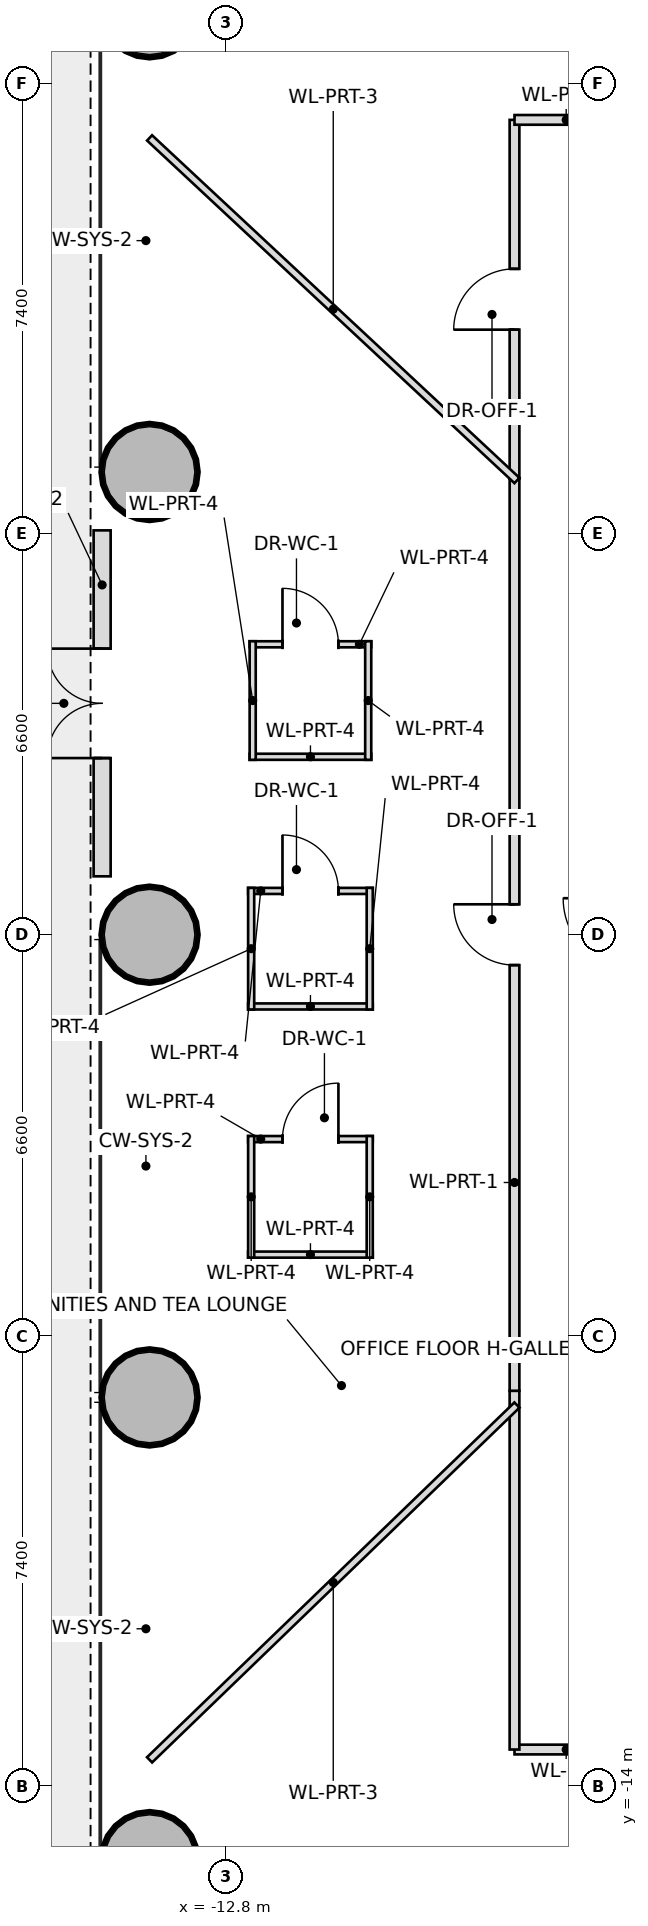
"""IFC4 building model, lengths in metres.
Left out: names, types, materials, properties, quantities, classifications, styles, units other than length and angle.
Written with IfcOpenShell. Run it as: python <this file> out.ifc"""

import sys

from ifc_helpers import new_model, si_unit, direction, frame, frame_2d, origin, origin_2d, place, context, subcontext, project, spatial, rectangle, hollow_circle, extrude, source, transform, mapped, element, fill, save


model = new_model("IFC4")
c1 = context("Model", 3, precision=1e-05, world=origin(), true_north=direction((0.0, 1.0)))
c2 = subcontext(c1, "Body", "Model", "MODEL_VIEW")
j1 = project(units=[si_unit("LENGTHUNIT", "METRE"), si_unit("PLANEANGLEUNIT", "RADIAN")], contexts=[c1])
p1 = place(None, origin())
s1 = spatial("IfcSite", under=j1, at=p1, CompositionType="ELEMENT")
p2 = place(p1, origin())
s2 = spatial("IfcBuilding", under=s1, at=p2, CompositionType="ELEMENT")
p3 = place(p2, frame((0.0, 0.0, 20.1)))
s3 = spatial("IfcBuildingStorey", under=s2, at=p3, CompositionType="ELEMENT", Elevation=20.1)
m1 = source(origin(), c2, "Body", "SweptSolid", [
    extrude(hollow_circle(Radius=0.8, WallThickness=0.055, at=origin_2d()), origin(), (0.0, 0.0, 1.0), 4.02),
])
for number, where, z_axis, x_axis in (
    (1, (-14.052, 15.219, -0.32), (0.0, 0.0, 1.0), (1.0, 0.0, 0.0)),
    (2, (-14.052, 7.61, -0.32), (0.0, 0.0, 1.0), (1.0, 0.0, 0.0)),
    (3, (-14.052, 0.0, -0.32), (0.0, 0.0, 1.0), (1.0, 0.0, 0.0)),
    (4, (-14.052, -7.61, -0.32), (0.0, 0.0, 1.0), (1.0, 0.0, 0.0)),
    (5, (-14.052, -15.219, -0.32), (0.0, 0.0, 1.0), (1.0, 0.0, 0.0)),
):
    element("IfcColumn", number, at=place(p3, frame(where, z_axis=z_axis, x_axis=x_axis)), inside=s3, PredefinedType="COLUMN", context=c2, shape_type="MappedRepresentation", body=[
        mapped(m1, transform((0.0, 0.0, 0.0), scale=1.0)),
    ])
p4 = place(p3, frame((-14.832, 0.96, 0.0), z_axis=(0.0, 0.0, 1.0), x_axis=(0.0, 1.0, 0.0)))
e6 = element("IfcWall", 6, at=p4, inside=s3, PredefinedType="SOLIDWALL", context=c2, shape_type="SweptSolid", body=[
    extrude(rectangle(XDim=5.689, YDim=0.28, at=frame_2d((2.845, 0.0))), origin(), (0.0, 0.0, 1.0), 2.915),
])
p5 = place(p4, frame((1.945, 0.0, 0.0)))
e7 = element("IfcOpeningElement", 7, at=p5, cuts=e6, PredefinedType="OPENING", context=c2, shape_type="SweptSolid", body=[
    extrude(rectangle(XDim=1.8, YDim=2.35, at=frame_2d((0.9, 1.175))), frame((0.0, 0.15, 0.0), z_axis=(0.0, -1.0, 0.0), x_axis=(1.0, 0.0, 0.0)), (0.0, 0.0, 1.0), 0.3),
])
p6 = place(p3, frame((-12.431, 0.72, 0.0), z_axis=(0.0, 0.0, 1.0), x_axis=(1.0, 0.0, 0.0)))
e8 = element("IfcWall", 8, at=p6, inside=s3, PredefinedType="PARTITIONING", context=c2, shape_type="SweptSolid", body=[
    extrude(rectangle(XDim=2.05, YDim=0.1, at=frame_2d((1.025, 0.0))), origin(), (0.0, 0.0, 1.0), 3.15),
])
p7 = place(p6, frame((0.565, 0.0, 0.0)))
e9 = element("IfcOpeningElement", 9, at=p7, cuts=e8, PredefinedType="OPENING", context=c2, shape_type="SweptSolid", body=[
    extrude(rectangle(XDim=0.92, YDim=2.1, at=frame_2d((0.46, 1.05))), frame((0.0, 0.06, 0.0), z_axis=(0.0, -1.0, 0.0), x_axis=(1.0, 0.0, 0.0)), (0.0, 0.0, 1.0), 0.12),
])
p8 = place(p3, frame((-10.381, -1.18, 0.0), z_axis=(0.0, 0.0, 1.0), x_axis=(-1.0, 0.0, 0.0)))
e10 = element("IfcWall", 10, at=p8, inside=s3, PredefinedType="PARTITIONING", context=c2, shape_type="SweptSolid", body=[
    extrude(rectangle(XDim=2.05, YDim=0.1, at=frame_2d((1.025, 0.0))), origin(), (0.0, 0.0, 1.0), 2.8),
])
p9 = place(p3, frame((-10.431, 0.77, 0.0), z_axis=(0.0, 0.0, 1.0), x_axis=(0.0, -1.0, 0.0)))
e11 = element("IfcWall", 11, at=p9, inside=s3, PredefinedType="PARTITIONING", context=c2, shape_type="SweptSolid", body=[
    extrude(rectangle(XDim=2.0, YDim=0.1, at=frame_2d((1.0, 0.0))), origin(), (0.0, 0.0, 1.0), 3.495),
])
p10 = place(p3, frame((-12.381, -1.23, 0.0), z_axis=(0.0, 0.0, 1.0), x_axis=(0.0, 1.0, 0.0)))
e12 = element("IfcWall", 12, at=p10, inside=s3, PredefinedType="PARTITIONING", context=c2, shape_type="SweptSolid", body=[
    extrude(rectangle(XDim=2.0, YDim=0.1, at=frame_2d((1.0, 0.0))), origin(), (0.0, 0.0, 1.0), 2.8),
])
p11 = place(p3, frame((-12.431, -3.361, 0.0), z_axis=(0.0, 0.0, 1.0), x_axis=(1.0, 0.0, 0.0)))
e13 = element("IfcWall", 13, at=p11, inside=s3, PredefinedType="PARTITIONING", context=c2, shape_type="SweptSolid", body=[
    extrude(rectangle(XDim=2.05, YDim=0.1, at=frame_2d((1.025, 0.0))), origin(), (0.0, 0.0, 1.0), 3.15),
])
p12 = place(p11, frame((0.565, 0.0, 0.0)))
e14 = element("IfcOpeningElement", 14, at=p12, cuts=e13, PredefinedType="OPENING", context=c2, shape_type="SweptSolid", body=[
    extrude(rectangle(XDim=0.92, YDim=2.1, at=frame_2d((0.46, 1.05))), frame((0.0, 0.06, 0.0), z_axis=(0.0, -1.0, 0.0), x_axis=(1.0, 0.0, 0.0)), (0.0, 0.0, 1.0), 0.12),
])
p13 = place(p3, frame((-10.381, -5.261, 0.0), z_axis=(0.0, 0.0, 1.0), x_axis=(-1.0, 0.0, 0.0)))
e15 = element("IfcWall", 15, at=p13, inside=s3, PredefinedType="PARTITIONING", context=c2, shape_type="SweptSolid", body=[
    extrude(rectangle(XDim=2.05, YDim=0.1, at=frame_2d((1.025, 0.0))), origin(), (0.0, 0.0, 1.0), 3.15),
])
for number, where, z_axis, x_axis in (
    (16, (-10.431, -3.311, 0.0), (0.0, 0.0, 1.0), (0.0, -1.0, 0.0)),
    (17, (-12.381, -5.311, 0.0), (0.0, 0.0, 1.0), (0.0, 1.0, 0.0)),
):
    element("IfcWall", number, at=place(p3, frame(where, z_axis=z_axis, x_axis=x_axis)), inside=s3, PredefinedType="PARTITIONING", context=c2, shape_type="SweptSolid", body=[
        extrude(rectangle(XDim=2.0, YDim=0.1, at=frame_2d((1.0, 0.0))), origin(), (0.0, 0.0, 1.0), 3.495),
    ])
p14 = place(p3, frame((-12.406, 4.776, 0.0), z_axis=(0.0, 0.0, 1.0), x_axis=(1.0, 0.0, 0.0)))
e18 = element("IfcWall", 18, at=p14, inside=s3, PredefinedType="PARTITIONING", context=c2, shape_type="SweptSolid", body=[
    extrude(rectangle(XDim=2.0, YDim=0.1, at=frame_2d((1.0, 0.0))), origin(), (0.0, 0.0, 1.0), 3.15),
])
p15 = place(p14, frame((0.54, 0.0, 0.0)))
e19 = element("IfcOpeningElement", 19, at=p15, cuts=e18, PredefinedType="OPENING", context=c2, shape_type="SweptSolid", body=[
    extrude(rectangle(XDim=0.92, YDim=2.1, at=frame_2d((0.46, 1.05))), frame((0.0, 0.06, 0.0), z_axis=(0.0, -1.0, 0.0), x_axis=(1.0, 0.0, 0.0)), (0.0, 0.0, 1.0), 0.12),
])
p16 = place(p3, frame((-10.406, 2.926, 0.0), z_axis=(0.0, 0.0, 1.0), x_axis=(-1.0, 0.0, 0.0)))
e20 = element("IfcWall", 20, at=p16, inside=s3, PredefinedType="PARTITIONING", context=c2, shape_type="SweptSolid", body=[
    extrude(rectangle(XDim=2.0, YDim=0.1, at=frame_2d((1.0, 0.0))), origin(), (0.0, 0.0, 1.0), 3.15),
])
for number, where, z_axis, x_axis in (
    (21, (-10.456, 4.826, 0.0), (0.0, 0.0, 1.0), (0.0, -1.0, 0.0)),
    (22, (-12.356, 2.876, 0.0), (0.0, 0.0, 1.0), (0.0, 1.0, 0.0)),
):
    element("IfcWall", number, at=place(p3, frame(where, z_axis=z_axis, x_axis=x_axis)), inside=s3, PredefinedType="PARTITIONING", context=c2, shape_type="SweptSolid", body=[
        extrude(rectangle(XDim=1.95, YDim=0.1, at=frame_2d((0.975, 0.0))), origin(), (0.0, 0.0, 1.0), 3.495),
    ])
p17 = place(p3, frame((-6.35, -13.4, 0.0), z_axis=(0.0, 0.0, 1.0), x_axis=(-1.0, 0.0, 0.0)))
e23 = element("IfcWall", 23, at=p17, inside=s3, PredefinedType="PARTITIONING", context=c2, shape_type="SweptSolid", body=[
    extrude(rectangle(XDim=1.7, YDim=0.16, at=frame_2d((0.85, 0.0))), origin(), (0.0, 0.0, 1.0), 2.8),
])
p18 = place(p3, frame((-8.05, -13.4, 0.0), z_axis=(0.0, 0.0, 1.0), x_axis=(0.0, 1.0, 0.0)))
e24 = element("IfcWall", 24, at=p18, inside=s3, PredefinedType="PARTITIONING", context=c2, shape_type="SweptSolid", body=[
    extrude(rectangle(XDim=5.9, YDim=0.16, at=frame_2d((2.95, 0.0))), origin(), (0.0, 0.0, 1.0), 2.8),
])
p19 = place(p3, frame((-8.05, -7.5, 0.0), z_axis=(0.0, 0.0, 1.0), x_axis=(0.0, 1.0, 0.0)))
e25 = element("IfcWall", 25, at=p19, inside=s3, PredefinedType="PARTITIONING", context=c2, shape_type="SweptSolid", body=[
    extrude(rectangle(XDim=15.0, YDim=0.16, at=frame_2d((7.5, 0.0))), origin(), (0.0, 0.0, 1.0), 2.8),
])
p20 = place(p19, frame((7.0, 0.0, 0.0)))
e26 = element("IfcOpeningElement", 26, at=p20, cuts=e25, PredefinedType="OPENING", context=c2, shape_type="SweptSolid", body=[
    extrude(rectangle(XDim=1.0, YDim=2.25, at=frame_2d((0.5, 1.125))), frame((0.0, 0.09, 0.0), z_axis=(0.0, -1.0, 0.0), x_axis=(1.0, 0.0, 0.0)), (0.0, 0.0, 1.0), 0.18),
])
p21 = place(p3, frame((-8.05, 7.5, 0.0), z_axis=(0.0, 0.0, 1.0), x_axis=(0.0, 1.0, 0.0)))
e27 = element("IfcWall", 27, at=p21, inside=s3, PredefinedType="PARTITIONING", context=c2, shape_type="SweptSolid", body=[
    extrude(rectangle(XDim=5.9, YDim=0.16, at=frame_2d((2.95, 0.0))), origin(), (0.0, 0.0, 1.0), 2.8),
])
p22 = place(p21, frame((2.45, 0.0, 0.0)))
e28 = element("IfcOpeningElement", 28, at=p22, cuts=e27, PredefinedType="OPENING", context=c2, shape_type="SweptSolid", body=[
    extrude(rectangle(XDim=1.0, YDim=2.25, at=frame_2d((0.5, 1.125))), frame((0.0, 0.09, 0.0), z_axis=(0.0, -1.0, 0.0), x_axis=(1.0, 0.0, 0.0)), (0.0, 0.0, 1.0), 0.18),
])
p23 = place(p3, frame((-8.05, 13.4, 0.0), z_axis=(0.0, 0.0, 1.0), x_axis=(1.0, 0.0, 0.0)))
e29 = element("IfcWall", 29, at=p23, inside=s3, PredefinedType="PARTITIONING", context=c2, shape_type="SweptSolid", body=[
    extrude(rectangle(XDim=1.7, YDim=0.16, at=frame_2d((0.85, 0.0))), origin(), (0.0, 0.0, 1.0), 2.8),
])
p24 = place(p3, frame((-8.01, 7.469, 0.0), z_axis=(0.0, 0.0, 1.0), x_axis=(-0.731351982223, 0.682000203885, 0.0)))
e30 = element("IfcWall", 30, at=p24, inside=s3, PredefinedType="PARTITIONING", context=c2, shape_type="SweptSolid", body=[
    extrude(rectangle(XDim=8.261, YDim=0.12, at=frame_2d((4.131, 0.0))), origin(), (0.0, 0.0, 1.0), 2.96),
])
p25 = place(p3, frame((-8.01, -7.735, 0.0), z_axis=(0.0, 0.0, 1.0), x_axis=(-0.719337851146, -0.694660388902, 0.0)))
e31 = element("IfcWall", 31, at=p25, inside=s3, PredefinedType="PARTITIONING", context=c2, shape_type="SweptSolid", body=[
    extrude(rectangle(XDim=8.399, YDim=0.12, at=frame_2d((4.2, 0.0))), origin(), (0.0, 0.0, 1.0), 2.8),
])
p26 = place(p5, origin())
e32 = element("IfcDoor", 32, at=p26, inside=s3, OperationType="DOUBLE_DOOR_SINGLE_SWING", PredefinedType="DOOR", context=c2, shape_type="SweptSolid", body=[
    extrude(rectangle(XDim=1.8, YDim=2.35, at=frame_2d((0.9, 1.175))), frame((0.0, 0.025, 0.0), z_axis=(0.0, -1.0, 0.0), x_axis=(1.0, 0.0, 0.0)), (0.0, 0.0, 1.0), 0.05),
])
fill(e7, e32)
p27 = place(p7, origin())
e33 = element("IfcDoor", 33, at=p27, inside=s3, OperationType="SINGLE_SWING_LEFT", PredefinedType="DOOR", context=c2, shape_type="SweptSolid", body=[
    extrude(rectangle(XDim=0.92, YDim=2.1, at=frame_2d((0.46, 1.05))), frame((0.0, 0.025, 0.0), z_axis=(0.0, -1.0, 0.0), x_axis=(1.0, 0.0, 0.0)), (0.0, 0.0, 1.0), 0.05),
])
fill(e9, e33)
p28 = place(p12, origin())
e34 = element("IfcDoor", 34, at=p28, inside=s3, OperationType="SINGLE_SWING_RIGHT", PredefinedType="DOOR", context=c2, shape_type="SweptSolid", body=[
    extrude(rectangle(XDim=0.92, YDim=2.1, at=frame_2d((0.46, 1.05))), frame((0.0, 0.025, 0.0), z_axis=(0.0, -1.0, 0.0), x_axis=(1.0, 0.0, 0.0)), (0.0, 0.0, 1.0), 0.05),
])
fill(e14, e34)
p29 = place(p15, origin())
e35 = element("IfcDoor", 35, at=p29, inside=s3, OperationType="SINGLE_SWING_LEFT", PredefinedType="DOOR", context=c2, shape_type="SweptSolid", body=[
    extrude(rectangle(XDim=0.92, YDim=2.1, at=frame_2d((0.46, 1.05))), frame((0.0, 0.025, 0.0), z_axis=(0.0, -1.0, 0.0), x_axis=(1.0, 0.0, 0.0)), (0.0, 0.0, 1.0), 0.05),
])
fill(e19, e35)
p30 = place(p20, origin())
e36 = element("IfcDoor", 36, at=p30, inside=s3, OperationType="SINGLE_SWING_RIGHT", PredefinedType="DOOR", context=c2, shape_type="SweptSolid", body=[
    extrude(rectangle(XDim=1.0, YDim=2.25, at=frame_2d((0.5, 1.125))), frame((0.0, 0.025, 0.0), z_axis=(0.0, -1.0, 0.0), x_axis=(1.0, 0.0, 0.0)), (0.0, 0.0, 1.0), 0.05),
])
fill(e26, e36)
p31 = place(p22, origin())
e37 = element("IfcDoor", 37, at=p31, inside=s3, OperationType="SINGLE_SWING_LEFT", PredefinedType="DOOR", context=c2, shape_type="SweptSolid", body=[
    extrude(rectangle(XDim=1.0, YDim=2.25, at=frame_2d((0.5, 1.125))), frame((0.0, 0.025, 0.0), z_axis=(0.0, -1.0, 0.0), x_axis=(1.0, 0.0, 0.0)), (0.0, 0.0, 1.0), 0.05),
])
fill(e28, e37)
save(model, sys.argv[1])
